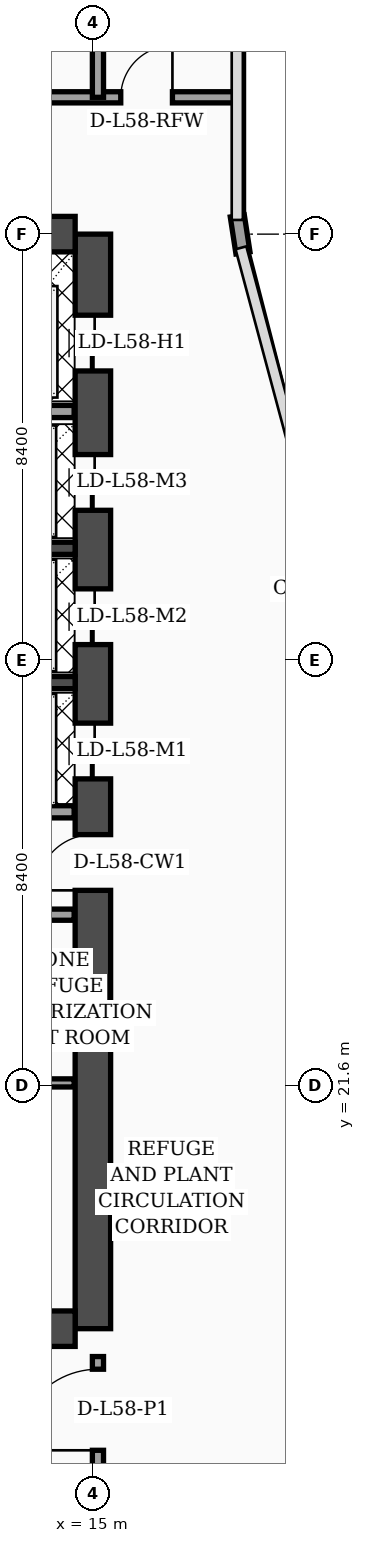
"""IFC4 building model, lengths in metres.
Left out: names, types, materials, properties, quantities, classifications, styles, units other than length and angle.
Written with IfcOpenShell. Run it as: python <this file> out.ifc"""

import sys

from ifc_helpers import new_model, si_unit, direction, frame, frame_2d, origin, place, context, subcontext, project, spatial, rectangle, extrude, element, fill, save


model = new_model("IFC4")
c1 = context("Model", 3, precision=1e-05, world=origin(), true_north=direction((0.0, 1.0)))
c2 = subcontext(c1, "Body", "Model", "MODEL_VIEW")
j1 = project(units=[si_unit("LENGTHUNIT", "METRE"), si_unit("PLANEANGLEUNIT", "RADIAN")], contexts=[c1])
p1 = place(None, origin())
s1 = spatial("IfcSite", under=j1, at=p1, CompositionType="ELEMENT")
p2 = place(p1, origin())
s2 = spatial("IfcBuilding", under=s1, at=p2, CompositionType="ELEMENT")
p3 = place(p2, frame((0.0, 0.0, 234.5)))
s3 = spatial("IfcBuildingStorey", under=s2, at=p3, CompositionType="ELEMENT", Elevation=234.5)
p4 = place(p3, frame((15.0, 16.8, 0.0), z_axis=(0.0, 0.0, 1.0), x_axis=(0.0, 1.0, 0.0)))
e1 = element("IfcWall", 1, at=p4, inside=s3, PredefinedType="SHEAR", context=c2, shape_type="SweptSolid", body=[
    extrude(rectangle(XDim=21.6, YDim=0.7, at=frame_2d((10.8, 0.0))), origin(), (0.0, 0.0, 1.0), 4.56),
])
p5 = place(p4, frame((8.65, 0.0, 0.0)))
e2 = element("IfcOpeningElement", 2, at=p5, cuts=e1, PredefinedType="OPENING", context=c2, shape_type="SweptSolid", body=[
    extrude(rectangle(XDim=1.1, YDim=2.2, at=frame_2d((0.55, 1.1))), frame((0.0, 0.36, 0.0), z_axis=(0.0, -1.0, 0.0), x_axis=(1.0, 0.0, 0.0)), (0.0, 0.0, 1.0), 0.72),
])
p6 = place(p4, frame((10.85, 0.0, 0.0)))
e3 = element("IfcOpeningElement", 3, at=p6, cuts=e1, PredefinedType="OPENING", context=c2, shape_type="SweptSolid", body=[
    extrude(rectangle(XDim=1.1, YDim=2.2, at=frame_2d((0.55, 1.1))), frame((0.0, 0.36, 0.0), z_axis=(0.0, -1.0, 0.0), x_axis=(1.0, 0.0, 0.0)), (0.0, 0.0, 1.0), 0.72),
])
p7 = place(p4, frame((13.5, 0.0, 0.0)))
e4 = element("IfcOpeningElement", 4, at=p7, cuts=e1, PredefinedType="OPENING", context=c2, shape_type="SweptSolid", body=[
    extrude(rectangle(XDim=1.1, YDim=2.2, at=frame_2d((0.55, 1.1))), frame((0.0, 0.36, 0.0), z_axis=(0.0, -1.0, 0.0), x_axis=(1.0, 0.0, 0.0)), (0.0, 0.0, 1.0), 0.72),
])
p8 = place(p4, frame((16.15, 0.0, 0.0)))
e5 = element("IfcOpeningElement", 5, at=p8, cuts=e1, PredefinedType="OPENING", context=c2, shape_type="SweptSolid", body=[
    extrude(rectangle(XDim=1.1, YDim=2.2, at=frame_2d((0.55, 1.1))), frame((0.0, 0.36, 0.0), z_axis=(0.0, -1.0, 0.0), x_axis=(1.0, 0.0, 0.0)), (0.0, 0.0, 1.0), 0.72),
])
p9 = place(p4, frame((18.9, 0.0, 0.0)))
e6 = element("IfcOpeningElement", 6, at=p9, cuts=e1, PredefinedType="OPENING", context=c2, shape_type="SweptSolid", body=[
    extrude(rectangle(XDim=1.1, YDim=2.2, at=frame_2d((0.55, 1.1))), frame((0.0, 0.36, 0.0), z_axis=(0.0, -1.0, 0.0), x_axis=(1.0, 0.0, 0.0)), (0.0, 0.0, 1.0), 0.72),
])
p10 = place(p3, frame((4.55, 38.4, 0.0), z_axis=(0.0, 0.0, 1.0), x_axis=(1.0, 0.0, 0.0)))
e7 = element("IfcWall", 7, at=p10, inside=s3, PredefinedType="SHEAR", context=c2, shape_type="SweptSolid", body=[
    extrude(rectangle(XDim=10.1, YDim=0.7, at=frame_2d((5.05, 0.0))), origin(), (0.0, 0.0, 1.0), 4.56),
])
p11 = place(p10, frame((5.75, 0.0, 0.0)))
e8 = element("IfcOpeningElement", 8, at=p11, cuts=e7, PredefinedType="OPENING", context=c2, shape_type="SweptSolid", body=[
    extrude(rectangle(XDim=1.1, YDim=2.2, at=frame_2d((0.55, 1.1))), frame((0.0, 0.36, 0.0), z_axis=(0.0, -1.0, 0.0), x_axis=(1.0, 0.0, 0.0)), (0.0, 0.0, 1.0), 0.72),
])
p12 = place(p3, frame((4.55, 16.8, 0.0), z_axis=(0.0, 0.0, 1.0), x_axis=(1.0, 0.0, 0.0)))
e9 = element("IfcWall", 9, at=p12, inside=s3, PredefinedType="SHEAR", context=c2, shape_type="SweptSolid", body=[
    extrude(rectangle(XDim=10.1, YDim=0.7, at=frame_2d((5.05, 0.0))), origin(), (0.0, 0.0, 1.0), 4.56),
])
for number, where, z_axis, x_axis in (
    (10, (12.18, 29.55, 0.0), (0.0, 0.0, 1.0), (1.0, 0.0, 0.0)),
    (11, (12.18, 32.2, 0.0), (0.0, 0.0, 1.0), (1.0, 0.0, 0.0)),
):
    element("IfcWall", number, at=place(p3, frame(where, z_axis=z_axis, x_axis=x_axis)), inside=s3, PredefinedType="SOLIDWALL", context=c2, shape_type="SweptSolid", body=[
        extrude(rectangle(XDim=2.47, YDim=0.24, at=frame_2d((1.235, 0.0))), origin(), (0.0, 0.0, 1.0), 4.56),
    ])
p13 = place(p3, frame((17.962, 38.03, 0.0), z_axis=(0.0, 0.0, 1.0), x_axis=(-0.15141125477, 0.988470855377, 0.0)))
e12 = element("IfcWall", 12, at=p13, inside=s3, PredefinedType="SOLIDWALL", context=c2, shape_type="SweptSolid", body=[
    extrude(rectangle(XDim=0.739, YDim=0.28, at=frame_2d((0.369, 0.0))), origin(), (0.0, 0.0, 1.0), 4.56),
])
p14 = place(p3, frame((9.68, 21.65, 0.0), z_axis=(0.0, 0.0, 1.0), x_axis=(1.0, 0.0, 0.0)))
e13 = element("IfcWall", 13, at=p14, inside=s3, PredefinedType="PARTITIONING", context=c2, shape_type="SweptSolid", body=[
    extrude(rectangle(XDim=4.95, YDim=0.16, at=frame_2d((2.475, 0.0))), origin(), (0.0, 0.0, 1.0), 4.56),
])
p15 = place(p14, frame((1.1, 0.0, 0.0)))
e14 = element("IfcOpeningElement", 14, at=p15, cuts=e13, PredefinedType="OPENING", context=c2, shape_type="SweptSolid", body=[
    extrude(rectangle(XDim=0.98, YDim=2.15, at=frame_2d((0.49, 1.075))), frame((0.0, 0.09, 0.0), z_axis=(0.0, -1.0, 0.0), x_axis=(1.0, 0.0, 0.0)), (0.0, 0.0, 1.0), 0.18),
])
p16 = place(p3, frame((9.68, 24.97, 0.0), z_axis=(0.0, 0.0, 1.0), x_axis=(1.0, 0.0, 0.0)))
e15 = element("IfcWall", 15, at=p16, inside=s3, PredefinedType="SOLIDWALL", context=c2, shape_type="SweptSolid", body=[
    extrude(rectangle(XDim=4.95, YDim=0.22, at=frame_2d((2.475, 0.0))), origin(), (0.0, 0.0, 1.0), 3.94),
])
p17 = place(p16, frame((0.9, 0.0, 0.0)))
e16 = element("IfcOpeningElement", 16, at=p17, cuts=e15, PredefinedType="OPENING", context=c2, shape_type="SweptSolid", body=[
    extrude(rectangle(XDim=0.98, YDim=2.15, at=frame_2d((0.49, 1.075))), frame((0.0, 0.12, 0.0), z_axis=(0.0, -1.0, 0.0), x_axis=(1.0, 0.0, 0.0)), (0.0, 0.0, 1.0), 0.24),
])
p18 = place(p3, frame((12.25, 27.0, 0.0), z_axis=(0.0, 0.0, 1.0), x_axis=(1.0, 0.0, 0.0)))
e17 = element("IfcWall", 17, at=p18, inside=s3, PredefinedType="SOLIDWALL", context=c2, shape_type="SweptSolid", body=[
    extrude(rectangle(XDim=2.38, YDim=0.24, at=frame_2d((1.19, 0.0))), origin(), (0.0, 0.0, 1.0), 4.56),
])
p19 = place(p3, frame((9.66, 34.9, 0.0), z_axis=(0.0, 0.0, 1.0), x_axis=(1.0, 0.0, 0.0)))
e18 = element("IfcWall", 18, at=p19, inside=s3, PredefinedType="SOLIDWALL", context=c2, shape_type="SweptSolid", body=[
    extrude(rectangle(XDim=4.97, YDim=0.24, at=frame_2d((2.485, 0.0))), origin(), (0.0, 0.0, 1.0), 4.56),
])
p20 = place(p3, frame((4.2, 41.1, 0.0), z_axis=(0.0, 0.0, 1.0), x_axis=(1.0, 0.0, 0.0)))
e19 = element("IfcWall", 19, at=p20, inside=s3, PredefinedType="SOLIDWALL", context=c2, shape_type="SweptSolid", body=[
    extrude(rectangle(XDim=13.65, YDim=0.22, at=frame_2d((6.825, 0.0))), origin(), (0.0, 0.0, 1.0), 3.94),
])
p21 = place(p20, frame((1.8, 0.0, 0.0)))
e20 = element("IfcOpeningElement", 20, at=p21, cuts=e19, PredefinedType="OPENING", context=c2, shape_type="SweptSolid", body=[
    extrude(rectangle(XDim=0.98, YDim=2.15, at=frame_2d((0.49, 1.075))), frame((0.0, 0.12, 0.0), z_axis=(0.0, -1.0, 0.0), x_axis=(1.0, 0.0, 0.0)), (0.0, 0.0, 1.0), 0.24),
])
p22 = place(p20, frame((6.8, 0.0, 0.0)))
e21 = element("IfcOpeningElement", 21, at=p22, cuts=e19, PredefinedType="OPENING", context=c2, shape_type="SweptSolid", body=[
    extrude(rectangle(XDim=1.15, YDim=2.2, at=frame_2d((0.575, 1.1))), frame((0.0, 0.12, 0.0), z_axis=(0.0, -1.0, 0.0), x_axis=(1.0, 0.0, 0.0)), (0.0, 0.0, 1.0), 0.24),
])
p23 = place(p20, frame((11.35, 0.0, 0.0)))
e22 = element("IfcOpeningElement", 22, at=p23, cuts=e19, PredefinedType="OPENING", context=c2, shape_type="SweptSolid", body=[
    extrude(rectangle(XDim=1.02, YDim=2.2, at=frame_2d((0.51, 1.1))), frame((0.0, 0.12, 0.0), z_axis=(0.0, -1.0, 0.0), x_axis=(1.0, 0.0, 0.0)), (0.0, 0.0, 1.0), 0.24),
])
p24 = place(p3, frame((15.1, 41.1, 0.0), z_axis=(0.0, 0.0, 1.0), x_axis=(0.0, 1.0, 0.0)))
e23 = element("IfcWall", 23, at=p24, inside=s3, PredefinedType="SOLIDWALL", context=c2, shape_type="SweptSolid", body=[
    extrude(rectangle(XDim=6.7, YDim=0.22, at=frame_2d((3.35, 0.0))), origin(), (0.0, 0.0, 1.0), 3.94),
])
p25 = place(p3, frame((15.1, 4.2, 0.0), z_axis=(0.0, 0.0, 1.0), x_axis=(0.0, 1.0, 0.0)))
e24 = element("IfcWall", 24, at=p25, inside=s3, PredefinedType="SOLIDWALL", context=c2, shape_type="SweptSolid", body=[
    extrude(rectangle(XDim=12.05, YDim=0.22, at=frame_2d((6.025, 0.0))), origin(), (0.0, 0.0, 1.0), 3.59),
])
p26 = place(p25, frame((10.2, 0.0, 0.0)))
e25 = element("IfcOpeningElement", 25, at=p26, cuts=e24, PredefinedType="OPENING", context=c2, shape_type="SweptSolid", body=[
    extrude(rectangle(XDim=1.6, YDim=2.35, at=frame_2d((0.8, 1.175))), frame((0.0, 0.12, 0.0), z_axis=(0.0, -1.0, 0.0), x_axis=(1.0, 0.0, 0.0)), (0.0, 0.0, 1.0), 0.24),
])
p27 = place(p23, origin())
e26 = element("IfcDoor", 26, at=p27, inside=s3, OperationType="SINGLE_SWING_RIGHT", PredefinedType="DOOR", context=c2, shape_type="SweptSolid", body=[
    extrude(rectangle(XDim=1.02, YDim=2.2, at=frame_2d((0.51, 1.1))), frame((0.0, 0.025, 0.0), z_axis=(0.0, -1.0, 0.0), x_axis=(1.0, 0.0, 0.0)), (0.0, 0.0, 1.0), 0.05),
])
fill(e22, e26)
p28 = place(p26, origin())
e27 = element("IfcDoor", 27, at=p28, inside=s3, OperationType="SINGLE_SWING_LEFT", PredefinedType="DOOR", context=c2, shape_type="SweptSolid", body=[
    extrude(rectangle(XDim=1.6, YDim=2.35, at=frame_2d((0.8, 1.175))), frame((0.0, 0.025, 0.0), z_axis=(0.0, -1.0, 0.0), x_axis=(1.0, 0.0, 0.0)), (0.0, 0.0, 1.0), 0.05),
])
fill(e25, e27)
p29 = place(p5, origin())
e28 = element("IfcDoor", 28, at=p29, inside=s3, OperationType="SINGLE_SWING_LEFT", PredefinedType="DOOR", context=c2, shape_type="SweptSolid", body=[
    extrude(rectangle(XDim=1.1, YDim=2.2, at=frame_2d((0.55, 1.1))), frame((0.0, 0.025, 0.0), z_axis=(0.0, -1.0, 0.0), x_axis=(1.0, 0.0, 0.0)), (0.0, 0.0, 1.0), 0.05),
])
fill(e2, e28)
p30 = place(p6, origin())
e29 = element("IfcDoor", 29, at=p30, inside=s3, OperationType="DOUBLE_DOOR_SLIDING", PredefinedType="DOOR", context=c2, shape_type="SweptSolid", body=[
    extrude(rectangle(XDim=1.1, YDim=2.2, at=frame_2d((0.55, 1.1))), frame((0.0, 0.025, 0.0), z_axis=(0.0, -1.0, 0.0), x_axis=(1.0, 0.0, 0.0)), (0.0, 0.0, 1.0), 0.05),
])
fill(e3, e29)
p31 = place(p7, origin())
e30 = element("IfcDoor", 30, at=p31, inside=s3, OperationType="DOUBLE_DOOR_SLIDING", PredefinedType="DOOR", context=c2, shape_type="SweptSolid", body=[
    extrude(rectangle(XDim=1.1, YDim=2.2, at=frame_2d((0.55, 1.1))), frame((0.0, 0.025, 0.0), z_axis=(0.0, -1.0, 0.0), x_axis=(1.0, 0.0, 0.0)), (0.0, 0.0, 1.0), 0.05),
])
fill(e4, e30)
p32 = place(p8, origin())
e31 = element("IfcDoor", 31, at=p32, inside=s3, OperationType="DOUBLE_DOOR_SLIDING", PredefinedType="DOOR", context=c2, shape_type="SweptSolid", body=[
    extrude(rectangle(XDim=1.1, YDim=2.2, at=frame_2d((0.55, 1.1))), frame((0.0, 0.025, 0.0), z_axis=(0.0, -1.0, 0.0), x_axis=(1.0, 0.0, 0.0)), (0.0, 0.0, 1.0), 0.05),
])
fill(e5, e31)
p33 = place(p9, origin())
e32 = element("IfcDoor", 32, at=p33, inside=s3, OperationType="DOUBLE_DOOR_SLIDING", PredefinedType="DOOR", context=c2, shape_type="SweptSolid", body=[
    extrude(rectangle(XDim=1.1, YDim=2.2, at=frame_2d((0.55, 1.1))), frame((0.0, 0.025, 0.0), z_axis=(0.0, -1.0, 0.0), x_axis=(1.0, 0.0, 0.0)), (0.0, 0.0, 1.0), 0.05),
])
fill(e6, e32)
save(model, sys.argv[1])
